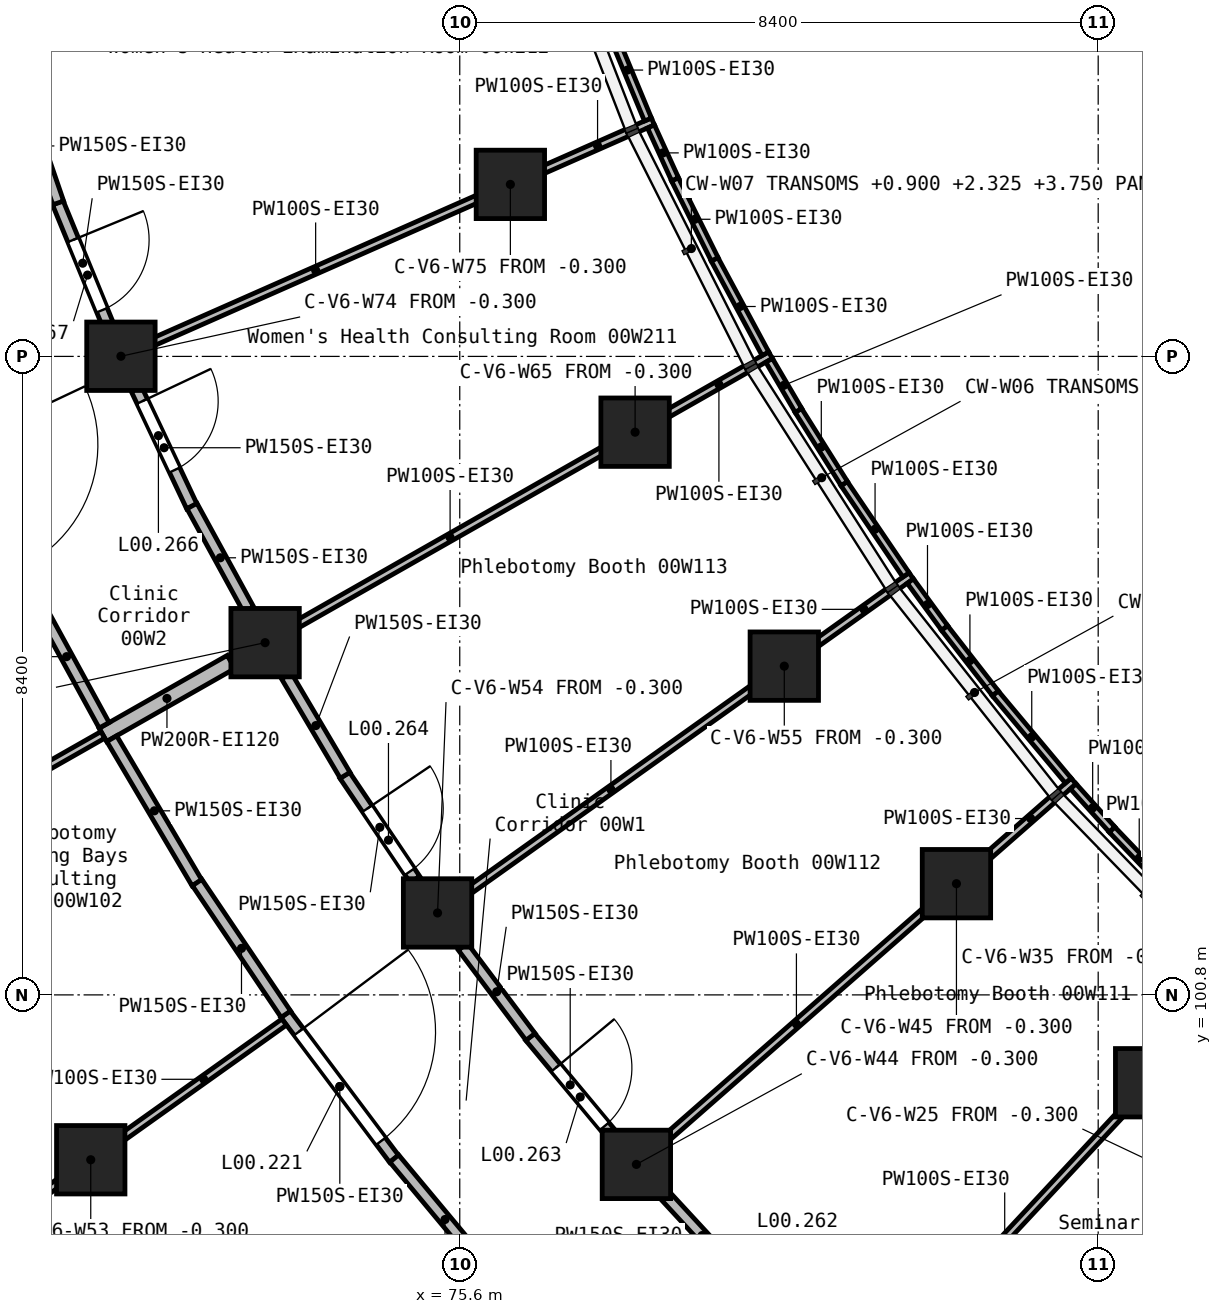
"""IFC4 building model, lengths in metres.
Left out: names, types, materials, properties, quantities, classifications, styles, units other than length and angle.
Written with IfcOpenShell. Run it as: python <this file> out.ifc"""

import sys

from ifc_helpers import new_model, si_unit, direction, frame, frame_2d, origin, origin_2d, place, context, subcontext, project, spatial, rectangle, extrude, element, fill, save


model = new_model("IFC4")
c1 = context("Model", 3, precision=1e-05, world=origin(), true_north=direction((0.0, 1.0)))
c2 = subcontext(c1, "Body", "Model", "MODEL_VIEW")
j1 = project(units=[si_unit("LENGTHUNIT", "METRE"), si_unit("PLANEANGLEUNIT", "RADIAN")], contexts=[c1])
p1 = place(None, origin())
s1 = spatial("IfcSite", under=j1, at=p1, CompositionType="ELEMENT")
p2 = place(p1, origin())
s2 = spatial("IfcBuilding", under=s1, at=p2, CompositionType="ELEMENT")
p3 = place(p2, origin())
s3 = spatial("IfcBuildingStorey", under=s2, at=p3, CompositionType="ELEMENT", Elevation=0.0)
for number, where, z_axis, x_axis in (
    (1, (70.745, 98.631, -0.3), (0.0, 0.0, 1.0), (1.0, 0.0, 0.0)),
    (2, (71.142, 109.202, -0.3), (0.0, 0.0, 1.0), (1.0, 0.0, 0.0)),
    (3, (73.039, 105.434, -0.3), (0.0, 0.0, 1.0), (1.0, 0.0, 0.0)),
    (4, (75.308, 101.878, -0.3), (0.0, 0.0, 1.0), (1.0, 0.0, 0.0)),
    (5, (76.266, 111.463, -0.3), (0.0, 0.0, 1.0), (1.0, 0.0, 0.0)),
    (6, (77.907, 108.203, -0.3), (0.0, 0.0, 1.0), (1.0, 0.0, 0.0)),
    (7, (77.924, 98.57, -0.3), (0.0, 0.0, 1.0), (1.0, 0.0, 0.0)),
    (8, (79.87, 105.125, -0.3), (0.0, 0.0, 1.0), (1.0, 0.0, 0.0)),
    (9, (82.135, 102.263, -0.3), (0.0, 0.0, 1.0), (1.0, 0.0, 0.0)),
    (10, (84.677, 99.644, -0.3), (0.0, 0.0, 1.0), (1.0, 0.0, 0.0)),
):
    element("IfcColumn", number, at=place(p3, frame(where, z_axis=z_axis, x_axis=x_axis)), inside=s3, PredefinedType="COLUMN", context=c2, shape_type="SweptSolid", body=[
        extrude(rectangle(XDim=0.9, YDim=0.9, at=origin_2d()), origin(), (0.0, 0.0, 1.0), 5.7),
    ])
p4 = place(p3, frame((70.905, 104.221, 0.0), z_axis=(0.0, 0.0, 1.0), x_axis=(0.869256176146, 0.494361912198, 0.0)))
e11 = element("IfcWall", 11, at=p4, inside=s3, PredefinedType="SOLIDWALL", context=c2, shape_type="SweptSolid", body=[
    extrude(rectangle(XDim=1.939, YDim=0.2, at=frame_2d((0.97, 0.0))), origin(), (0.0, 0.0, 1.0), 5.05),
])
p5 = place(p3, frame((73.307, 100.547, 0.0), z_axis=(0.0, 0.0, 1.0), x_axis=(0.600377090661, -0.799717043091, 0.0)))
e12 = element("IfcWall", 12, at=p5, inside=s3, PredefinedType="PARTITIONING", context=c2, shape_type="SweptSolid", body=[
    extrude(rectangle(XDim=2.382, YDim=0.15, at=frame_2d((1.191, 0.0))), origin(), (0.0, 0.0, 1.0), 5.05),
])
p6 = place(p5, frame((0.291, 0.0, 0.0)))
e13 = element("IfcOpeningElement", 13, at=p6, cuts=e12, PredefinedType="OPENING", context=c2, shape_type="SweptSolid", body=[
    extrude(rectangle(XDim=1.8, YDim=2.1, at=frame_2d((0.9, 1.05))), frame((0.0, 0.085, 0.0), z_axis=(0.0, -1.0, 0.0), x_axis=(1.0, 0.0, 0.0)), (0.0, 0.0, 1.0), 0.17),
])
p7 = place(p3, frame((71.021, 104.171, 0.0), z_axis=(0.0, 0.0, 1.0), x_axis=(0.50873677225, -0.860922119916, 0.0)))
e14 = element("IfcWall", 14, at=p7, inside=s3, PredefinedType="PARTITIONING", context=c2, shape_type="SweptSolid", body=[
    extrude(rectangle(XDim=2.205, YDim=0.15, at=frame_2d((1.103, 0.0))), origin(), (0.0, 0.0, 1.0), 5.05),
])
p8 = place(p3, frame((72.145, 102.278, 0.0), z_axis=(0.0, 0.0, 1.0), x_axis=(0.558900636953, -0.829234633873, 0.0)))
e15 = element("IfcWall", 15, at=p8, inside=s3, PredefinedType="PARTITIONING", context=c2, shape_type="SweptSolid", body=[
    extrude(rectangle(XDim=2.089, YDim=0.15, at=frame_2d((1.044, 0.0))), origin(), (0.0, 0.0, 1.0), 5.05),
])
p9 = place(p3, frame((74.738, 98.647, 0.0), z_axis=(0.0, 0.0, 1.0), x_axis=(0.640000381719, -0.768374590548, 0.0)))
e16 = element("IfcWall", 16, at=p9, inside=s3, PredefinedType="PARTITIONING", context=c2, shape_type="SweptSolid", body=[
    extrude(rectangle(XDim=2.088, YDim=0.15, at=frame_2d((1.044, 0.0))), origin(), (0.0, 0.0, 1.0), 5.05),
])
p10 = place(p3, frame((69.933, 106.153, 0.0), z_axis=(0.0, 0.0, 1.0), x_axis=(0.479964929401, -0.877287676047, 0.0)))
e17 = element("IfcWall", 17, at=p10, inside=s3, PredefinedType="PARTITIONING", context=c2, shape_type="SweptSolid", body=[
    extrude(rectangle(XDim=2.059, YDim=0.15, at=frame_2d((1.03, 0.0))), origin(), (0.0, 0.0, 1.0), 5.05),
])
p11 = place(p3, frame((74.086, 103.69, 0.0), z_axis=(0.0, 0.0, 1.0), x_axis=(0.558985889655, -0.829177167538, 0.0)))
e18 = element("IfcWall", 18, at=p11, inside=s3, PredefinedType="PARTITIONING", context=c2, shape_type="SweptSolid", body=[
    extrude(rectangle(XDim=1.654, YDim=0.15, at=frame_2d((0.827, 0.0))), origin(), (0.0, 0.0, 1.0), 5.05),
])
p12 = place(p11, frame((0.53, 0.0, 0.0)))
e19 = element("IfcOpeningElement", 19, at=p12, cuts=e18, PredefinedType="OPENING", context=c2, shape_type="SweptSolid", body=[
    extrude(rectangle(XDim=1.0, YDim=2.1, at=frame_2d((0.5, 1.05))), frame((0.0, 0.085, 0.0), z_axis=(0.0, -1.0, 0.0), x_axis=(1.0, 0.0, 0.0)), (0.0, 0.0, 1.0), 0.17),
])
p13 = place(p3, frame((71.346, 108.771, 0.0), z_axis=(0.0, 0.0, 1.0), x_axis=(0.42702903496, -0.904237912997, 0.0)))
e20 = element("IfcWall", 20, at=p13, inside=s3, PredefinedType="PARTITIONING", context=c2, shape_type="SweptSolid", body=[
    extrude(rectangle(XDim=1.708, YDim=0.15, at=frame_2d((0.854, 0.0))), origin(), (0.0, 0.0, 1.0), 5.05),
])
p14 = place(p13, frame((0.178, 0.0, 0.0)))
e21 = element("IfcOpeningElement", 21, at=p14, cuts=e20, PredefinedType="OPENING", context=c2, shape_type="SweptSolid", body=[
    extrude(rectangle(XDim=1.0, YDim=2.1, at=frame_2d((0.5, 1.05))), frame((0.0, 0.085, 0.0), z_axis=(0.0, -1.0, 0.0), x_axis=(1.0, 0.0, 0.0)), (0.0, 0.0, 1.0), 0.17),
])
p15 = place(p3, frame((78.27, 98.195, 0.0), z_axis=(0.0, 0.0, 1.0), x_axis=(0.678273469528, -0.73480956753, 0.0)))
e22 = element("IfcWall", 22, at=p15, inside=s3, PredefinedType="PARTITIONING", context=c2, shape_type="SweptSolid", body=[
    extrude(rectangle(XDim=1.529, YDim=0.15, at=frame_2d((0.764, 0.0))), origin(), (0.0, 0.0, 1.0), 5.05),
])
p16 = place(p3, frame((76.526, 100.249, 0.0), z_axis=(0.0, 0.0, 1.0), x_axis=(0.640038659854, -0.768342706019, 0.0)))
e23 = element("IfcWall", 23, at=p16, inside=s3, PredefinedType="PARTITIONING", context=c2, shape_type="SweptSolid", body=[
    extrude(rectangle(XDim=1.648, YDim=0.15, at=frame_2d((0.824, 0.0))), origin(), (0.0, 0.0, 1.0), 5.05),
])
p17 = place(p16, frame((0.53, 0.0, 0.0)))
e24 = element("IfcOpeningElement", 24, at=p17, cuts=e23, PredefinedType="OPENING", context=c2, shape_type="SweptSolid", body=[
    extrude(rectangle(XDim=1.0, YDim=2.1, at=frame_2d((0.5, 1.05))), frame((0.0, 0.085, 0.0), z_axis=(0.0, -1.0, 0.0), x_axis=(1.0, 0.0, 0.0)), (0.0, 0.0, 1.0), 0.17),
])
p18 = place(p3, frame((70.312, 111.222, 0.0), z_axis=(0.0, 0.0, 1.0), x_axis=(0.380150665177, -0.924924576258, 0.0)))
e25 = element("IfcWall", 25, at=p18, inside=s3, PredefinedType="PARTITIONING", context=c2, shape_type="SweptSolid", body=[
    extrude(rectangle(XDim=1.722, YDim=0.15, at=frame_2d((0.861, 0.0))), origin(), (0.0, 0.0, 1.0), 5.05),
])
p19 = place(p18, frame((0.53, 0.0, 0.0)))
e26 = element("IfcOpeningElement", 26, at=p19, cuts=e25, PredefinedType="OPENING", context=c2, shape_type="SweptSolid", body=[
    extrude(rectangle(XDim=1.0, YDim=2.1, at=frame_2d((0.5, 1.05))), frame((0.0, 0.085, 0.0), z_axis=(0.0, -1.0, 0.0), x_axis=(1.0, 0.0, 0.0)), (0.0, 0.0, 1.0), 0.17),
])
p20 = place(p3, frame((73.319, 104.997, 0.0), z_axis=(0.0, 0.0, 1.0), x_axis=(0.508740142918, -0.86092012811, 0.0)))
e27 = element("IfcWall", 27, at=p20, inside=s3, PredefinedType="PARTITIONING", context=c2, shape_type="SweptSolid", body=[
    extrude(rectangle(XDim=1.519, YDim=0.15, at=frame_2d((0.759, 0.0))), origin(), (0.0, 0.0, 1.0), 5.05),
])
p21 = place(p3, frame((75.641, 101.434, 0.0), z_axis=(0.0, 0.0, 1.0), x_axis=(0.60023710435, -0.799822116825, 0.0)))
e28 = element("IfcWall", 28, at=p21, inside=s3, PredefinedType="PARTITIONING", context=c2, shape_type="SweptSolid", body=[
    extrude(rectangle(XDim=1.483, YDim=0.15, at=frame_2d((0.741, 0.0))), origin(), (0.0, 0.0, 1.0), 5.05),
])
p22 = place(p3, frame((72.077, 107.232, 0.0), z_axis=(0.0, 0.0, 1.0), x_axis=(0.480041086357, -0.877246006209, 0.0)))
e29 = element("IfcWall", 29, at=p22, inside=s3, PredefinedType="PARTITIONING", context=c2, shape_type="SweptSolid", body=[
    extrude(rectangle(XDim=1.553, YDim=0.15, at=frame_2d((0.777, 0.0))), origin(), (0.0, 0.0, 1.0), 5.05),
])
p23 = place(p3, frame((69.802, 112.718, 0.0), z_axis=(0.0, 0.0, 1.0), x_axis=(0.32490745983, -0.945745812863, 0.0)))
e30 = element("IfcWall", 30, at=p23, inside=s3, PredefinedType="PARTITIONING", context=c2, shape_type="SweptSolid", body=[
    extrude(rectangle(XDim=1.584, YDim=0.15, at=frame_2d((0.792, 0.0))), origin(), (0.0, 0.0, 1.0), 5.05),
])
p24 = place(p3, frame((71.562, 109.387, 0.0), z_axis=(0.0, 0.0, 1.0), x_axis=(0.914844742968, 0.403805765515, 0.0)))
e31 = element("IfcWall", 31, at=p24, inside=s3, PredefinedType="PARTITIONING", context=c2, shape_type="SweptSolid", body=[
    extrude(rectangle(XDim=4.683, YDim=0.1, at=frame_2d((2.342, 0.0))), origin(), (0.0, 0.0, 1.0), 5.05),
])
p25 = place(p3, frame((76.686, 111.649, 0.0), z_axis=(0.0, 0.0, 1.0), x_axis=(0.914802710669, 0.403900978649, 0.0)))
e32 = element("IfcWall", 32, at=p25, inside=s3, PredefinedType="PARTITIONING", context=c2, shape_type="SweptSolid", body=[
    extrude(rectangle(XDim=1.59, YDim=0.1, at=frame_2d((0.795, 0.0))), origin(), (0.0, 0.0, 1.0), 5.05),
])
p26 = place(p3, frame((78.338, 98.933, 0.0), z_axis=(0.0, 0.0, 1.0), x_axis=(0.751823288541, 0.659364650863, 0.0)))
e33 = element("IfcWall", 33, at=p26, inside=s3, PredefinedType="PARTITIONING", context=c2, shape_type="SweptSolid", body=[
    extrude(rectangle(XDim=4.5, YDim=0.1, at=frame_2d((2.25, 0.0))), origin(), (0.0, 0.0, 1.0), 5.05),
])
p27 = place(p3, frame((82.549, 102.626, 0.0), z_axis=(0.0, 0.0, 1.0), x_axis=(0.751798799024, 0.659392573347, 0.0)))
e34 = element("IfcWall", 34, at=p27, inside=s3, PredefinedType="PARTITIONING", context=c2, shape_type="SweptSolid", body=[
    extrude(rectangle(XDim=1.498, YDim=0.1, at=frame_2d((0.749, 0.0))), origin(), (0.0, 0.0, 1.0), 5.05),
])
p28 = place(p3, frame((75.736, 102.183, 0.0), z_axis=(0.0, 0.0, 1.0), x_axis=(0.8147152487, 0.579861245072, 0.0)))
e35 = element("IfcWall", 35, at=p28, inside=s3, PredefinedType="PARTITIONING", context=c2, shape_type="SweptSolid", body=[
    extrude(rectangle(XDim=4.548, YDim=0.1, at=frame_2d((2.274, 0.0))), origin(), (0.0, 0.0, 1.0), 5.05),
])
p29 = place(p3, frame((80.298, 105.43, 0.0), z_axis=(0.0, 0.0, 1.0), x_axis=(0.814728250396, 0.579842977027, 0.0)))
e36 = element("IfcWall", 36, at=p29, inside=s3, PredefinedType="PARTITIONING", context=c2, shape_type="SweptSolid", body=[
    extrude(rectangle(XDim=1.524, YDim=0.1, at=frame_2d((0.762, 0.0))), origin(), (0.0, 0.0, 1.0), 5.05),
])
p30 = place(p3, frame((81.227, 95.935, 0.0), z_axis=(0.0, 0.0, 1.0), x_axis=(0.681211440492, 0.732086725288, 0.0)))
e37 = element("IfcWall", 37, at=p30, inside=s3, PredefinedType="PARTITIONING", context=c2, shape_type="SweptSolid", body=[
    extrude(rectangle(XDim=4.53, YDim=0.1, at=frame_2d((2.265, 0.0))), origin(), (0.0, 0.0, 1.0), 5.05),
])
p31 = place(p3, frame((73.463, 105.676, 0.0), z_axis=(0.0, 0.0, 1.0), x_axis=(0.8692549769, 0.494364020874, 0.0)))
e38 = element("IfcWall", 38, at=p31, inside=s3, PredefinedType="PARTITIONING", context=c2, shape_type="SweptSolid", body=[
    extrude(rectangle(XDim=4.625, YDim=0.1, at=frame_2d((2.312, 0.0))), origin(), (0.0, 0.0, 1.0), 5.05),
])
p32 = place(p3, frame((78.331, 108.445, 0.0), z_axis=(0.0, 0.0, 1.0), x_axis=(0.869222922884, 0.494420378154, 0.0)))
e39 = element("IfcWall", 39, at=p32, inside=s3, PredefinedType="PARTITIONING", context=c2, shape_type="SweptSolid", body=[
    extrude(rectangle(XDim=1.561, YDim=0.1, at=frame_2d((0.781, 0.0))), origin(), (0.0, 0.0, 1.0), 5.05),
])
p33 = place(p3, frame((68.595, 102.907, 0.0), z_axis=(0.0, 0.0, 1.0), x_axis=(0.869270757215, 0.494336272846, 0.0)))
e40 = element("IfcWall", 40, at=p33, inside=s3, PredefinedType="PARTITIONING", context=c2, shape_type="SweptSolid", body=[
    extrude(rectangle(XDim=2.656, YDim=0.1, at=frame_2d((1.328, 0.0))), origin(), (0.0, 0.0, 1.0), 5.05),
])
p34 = place(p3, frame((68.861, 97.29, 0.0), z_axis=(0.0, 0.0, 1.0), x_axis=(0.814701484378, 0.5798805837, 0.0)))
e41 = element("IfcWall", 41, at=p34, inside=s3, PredefinedType="PARTITIONING", context=c2, shape_type="SweptSolid", body=[
    extrude(rectangle(XDim=1.787, YDim=0.1, at=frame_2d((0.894, 0.0))), origin(), (0.0, 0.0, 1.0), 5.05),
])
p35 = place(p3, frame((71.173, 98.936, 0.0), z_axis=(0.0, 0.0, 1.0), x_axis=(0.814672160951, 0.579921779355, 0.0)))
e42 = element("IfcWall", 42, at=p35, inside=s3, PredefinedType="PARTITIONING", context=c2, shape_type="SweptSolid", body=[
    extrude(rectangle(XDim=2.598, YDim=0.1, at=frame_2d((1.299, 0.0))), origin(), (0.0, 0.0, 1.0), 5.05),
])
p36 = place(p3, frame((82.645, 104.768, 0.0), z_axis=(0.0, 0.0, 1.0), x_axis=(0.641529064264, -0.767098728785, 0.0)))
e43 = element("IfcWall", 43, at=p36, inside=s3, PredefinedType="PARTITIONING", context=c2, shape_type="SweptSolid", body=[
    extrude(rectangle(XDim=1.499, YDim=0.1, at=frame_2d((0.75, 0.0))), origin(), (0.0, 0.0, 1.0), 5.05),
])
p37 = place(p3, frame((80.657, 107.527, 0.0), z_axis=(0.0, 0.0, 1.0), x_axis=(0.561086061718, -0.827757471332, 0.0)))
e44 = element("IfcWall", 44, at=p37, inside=s3, PredefinedType="PARTITIONING", context=c2, shape_type="SweptSolid", body=[
    extrude(rectangle(XDim=1.452, YDim=0.1, at=frame_2d((0.726, 0.0))), origin(), (0.0, 0.0, 1.0), 5.05),
])
p38 = place(p3, frame((78.952, 110.478, 0.0), z_axis=(0.0, 0.0, 1.0), x_axis=(0.474192635092, -0.880421117889, 0.0)))
e45 = element("IfcWall", 45, at=p38, inside=s3, PredefinedType="PARTITIONING", context=c2, shape_type="SweptSolid", body=[
    extrude(rectangle(XDim=1.412, YDim=0.1, at=frame_2d((0.706, 0.0))), origin(), (0.0, 0.0, 1.0), 5.05),
])
p39 = place(p3, frame((77.536, 113.618, 0.0), z_axis=(0.0, 0.0, 1.0), x_axis=(0.383274532271, -0.923634469318, 0.0)))
e46 = element("IfcWall", 46, at=p39, inside=s3, PredefinedType="PARTITIONING", context=c2, shape_type="SweptSolid", body=[
    extrude(rectangle(XDim=1.41, YDim=0.1, at=frame_2d((0.705, 0.0))), origin(), (0.0, 0.0, 1.0), 5.05),
])
p40 = place(p3, frame((78.431, 111.531, 0.0), z_axis=(0.0, 0.0, 1.0), x_axis=(0.445137160255, -0.8954623993, 0.0)))
e47 = element("IfcWall", 47, at=p40, inside=s3, PredefinedType="PARTITIONING", context=c2, shape_type="SweptSolid", body=[
    extrude(rectangle(XDim=1.177, YDim=0.1, at=frame_2d((0.588, 0.0))), origin(), (0.0, 0.0, 1.0), 5.05),
])
p41 = place(p3, frame((80.054, 108.49, 0.0), z_axis=(0.0, 0.0, 1.0), x_axis=(0.531657145883, -0.846959668008, 0.0)))
e48 = element("IfcWall", 48, at=p41, inside=s3, PredefinedType="PARTITIONING", context=c2, shape_type="SweptSolid", body=[
    extrude(rectangle(XDim=1.137, YDim=0.1, at=frame_2d((0.569, 0.0))), origin(), (0.0, 0.0, 1.0), 5.05),
])
p42 = place(p3, frame((81.977, 105.628, 0.0), z_axis=(0.0, 0.0, 1.0), x_axis=(0.61437453726, -0.78901452963, 0.0)))
e49 = element("IfcWall", 49, at=p42, inside=s3, PredefinedType="PARTITIONING", context=c2, shape_type="SweptSolid", body=[
    extrude(rectangle(XDim=1.09, YDim=0.1, at=frame_2d((0.545, 0.0))), origin(), (0.0, 0.0, 1.0), 5.05),
])
p43 = place(p3, frame((84.18, 102.976, 0.0), z_axis=(0.0, 0.0, 1.0), x_axis=(0.691094804644, -0.722764118502, 0.0)))
e50 = element("IfcWall", 50, at=p43, inside=s3, PredefinedType="PARTITIONING", context=c2, shape_type="SweptSolid", body=[
    extrude(rectangle(XDim=1.041, YDim=0.1, at=frame_2d((0.521, 0.0))), origin(), (0.0, 0.0, 1.0), 5.05),
])
p44 = place(p3, frame((78.116, 112.225, 0.0), z_axis=(0.0, 0.0, 1.0), x_axis=(0.414838086324, -0.909895247891, 0.0)))
e51 = element("IfcWall", 51, at=p44, inside=s3, PredefinedType="PARTITIONING", context=c2, shape_type="SweptSolid", body=[
    extrude(rectangle(XDim=0.764, YDim=0.1, at=frame_2d((0.382, 0.0))), origin(), (0.0, 0.0, 1.0), 5.05),
])
p45 = place(p3, frame((83.672, 103.543, 0.0), z_axis=(0.0, 0.0, 1.0), x_axis=(0.66903540409, -0.743230534945, 0.0)))
e52 = element("IfcWall", 52, at=p45, inside=s3, PredefinedType="PARTITIONING", context=c2, shape_type="SweptSolid", body=[
    extrude(rectangle(XDim=0.763, YDim=0.1, at=frame_2d((0.382, 0.0))), origin(), (0.0, 0.0, 1.0), 5.05),
])
p46 = place(p3, frame((79.671, 109.148, 0.0), z_axis=(0.0, 0.0, 1.0), x_axis=(0.505620943658, -0.862755736773, 0.0)))
e53 = element("IfcWall", 53, at=p46, inside=s3, PredefinedType="PARTITIONING", context=c2, shape_type="SweptSolid", body=[
    extrude(rectangle(XDim=0.763, YDim=0.1, at=frame_2d((0.381, 0.0))), origin(), (0.0, 0.0, 1.0), 5.05),
])
p47 = place(p3, frame((81.529, 106.244, 0.0), z_axis=(0.0, 0.0, 1.0), x_axis=(0.590281268128, -0.807197636578, 0.0)))
e54 = element("IfcWall", 54, at=p47, inside=s3, PredefinedType="PARTITIONING", context=c2, shape_type="SweptSolid", body=[
    extrude(rectangle(XDim=0.763, YDim=0.1, at=frame_2d((0.382, 0.0))), origin(), (0.0, 0.0, 1.0), 5.05),
])
p48 = place(p6, origin())
e55 = element("IfcDoor", 55, at=p48, inside=s3, OperationType="DOUBLE_DOOR_SINGLE_SWING", PredefinedType="DOOR", context=c2, shape_type="SweptSolid", body=[
    extrude(rectangle(XDim=1.8, YDim=2.1, at=frame_2d((0.9, 1.05))), frame((0.0, 0.025, 0.0), z_axis=(0.0, -1.0, 0.0), x_axis=(1.0, 0.0, 0.0)), (0.0, 0.0, 1.0), 0.05),
])
fill(e13, e55)
p49 = place(p17, origin())
e56 = element("IfcDoor", 56, at=p49, inside=s3, OperationType="SINGLE_SWING_RIGHT", PredefinedType="DOOR", context=c2, shape_type="SweptSolid", body=[
    extrude(rectangle(XDim=1.0, YDim=2.1, at=frame_2d((0.5, 1.05))), frame((0.0, 0.025, 0.0), z_axis=(0.0, -1.0, 0.0), x_axis=(1.0, 0.0, 0.0)), (0.0, 0.0, 1.0), 0.05),
])
fill(e24, e56)
p50 = place(p12, origin())
e57 = element("IfcDoor", 57, at=p50, inside=s3, OperationType="SINGLE_SWING_RIGHT", PredefinedType="DOOR", context=c2, shape_type="SweptSolid", body=[
    extrude(rectangle(XDim=1.0, YDim=2.1, at=frame_2d((0.5, 1.05))), frame((0.0, 0.025, 0.0), z_axis=(0.0, -1.0, 0.0), x_axis=(1.0, 0.0, 0.0)), (0.0, 0.0, 1.0), 0.05),
])
fill(e19, e57)
p51 = place(p14, origin())
e58 = element("IfcDoor", 58, at=p51, inside=s3, OperationType="SINGLE_SWING_LEFT", PredefinedType="DOOR", context=c2, shape_type="SweptSolid", body=[
    extrude(rectangle(XDim=1.0, YDim=2.1, at=frame_2d((0.5, 1.05))), frame((0.0, 0.025, 0.0), z_axis=(0.0, -1.0, 0.0), x_axis=(1.0, 0.0, 0.0)), (0.0, 0.0, 1.0), 0.05),
])
fill(e21, e58)
p52 = place(p19, origin())
e59 = element("IfcDoor", 59, at=p52, inside=s3, OperationType="SINGLE_SWING_RIGHT", PredefinedType="DOOR", context=c2, shape_type="SweptSolid", body=[
    extrude(rectangle(XDim=1.0, YDim=2.1, at=frame_2d((0.5, 1.05))), frame((0.0, 0.025, 0.0), z_axis=(0.0, -1.0, 0.0), x_axis=(1.0, 0.0, 0.0)), (0.0, 0.0, 1.0), 0.05),
])
fill(e26, e59)
save(model, sys.argv[1])
